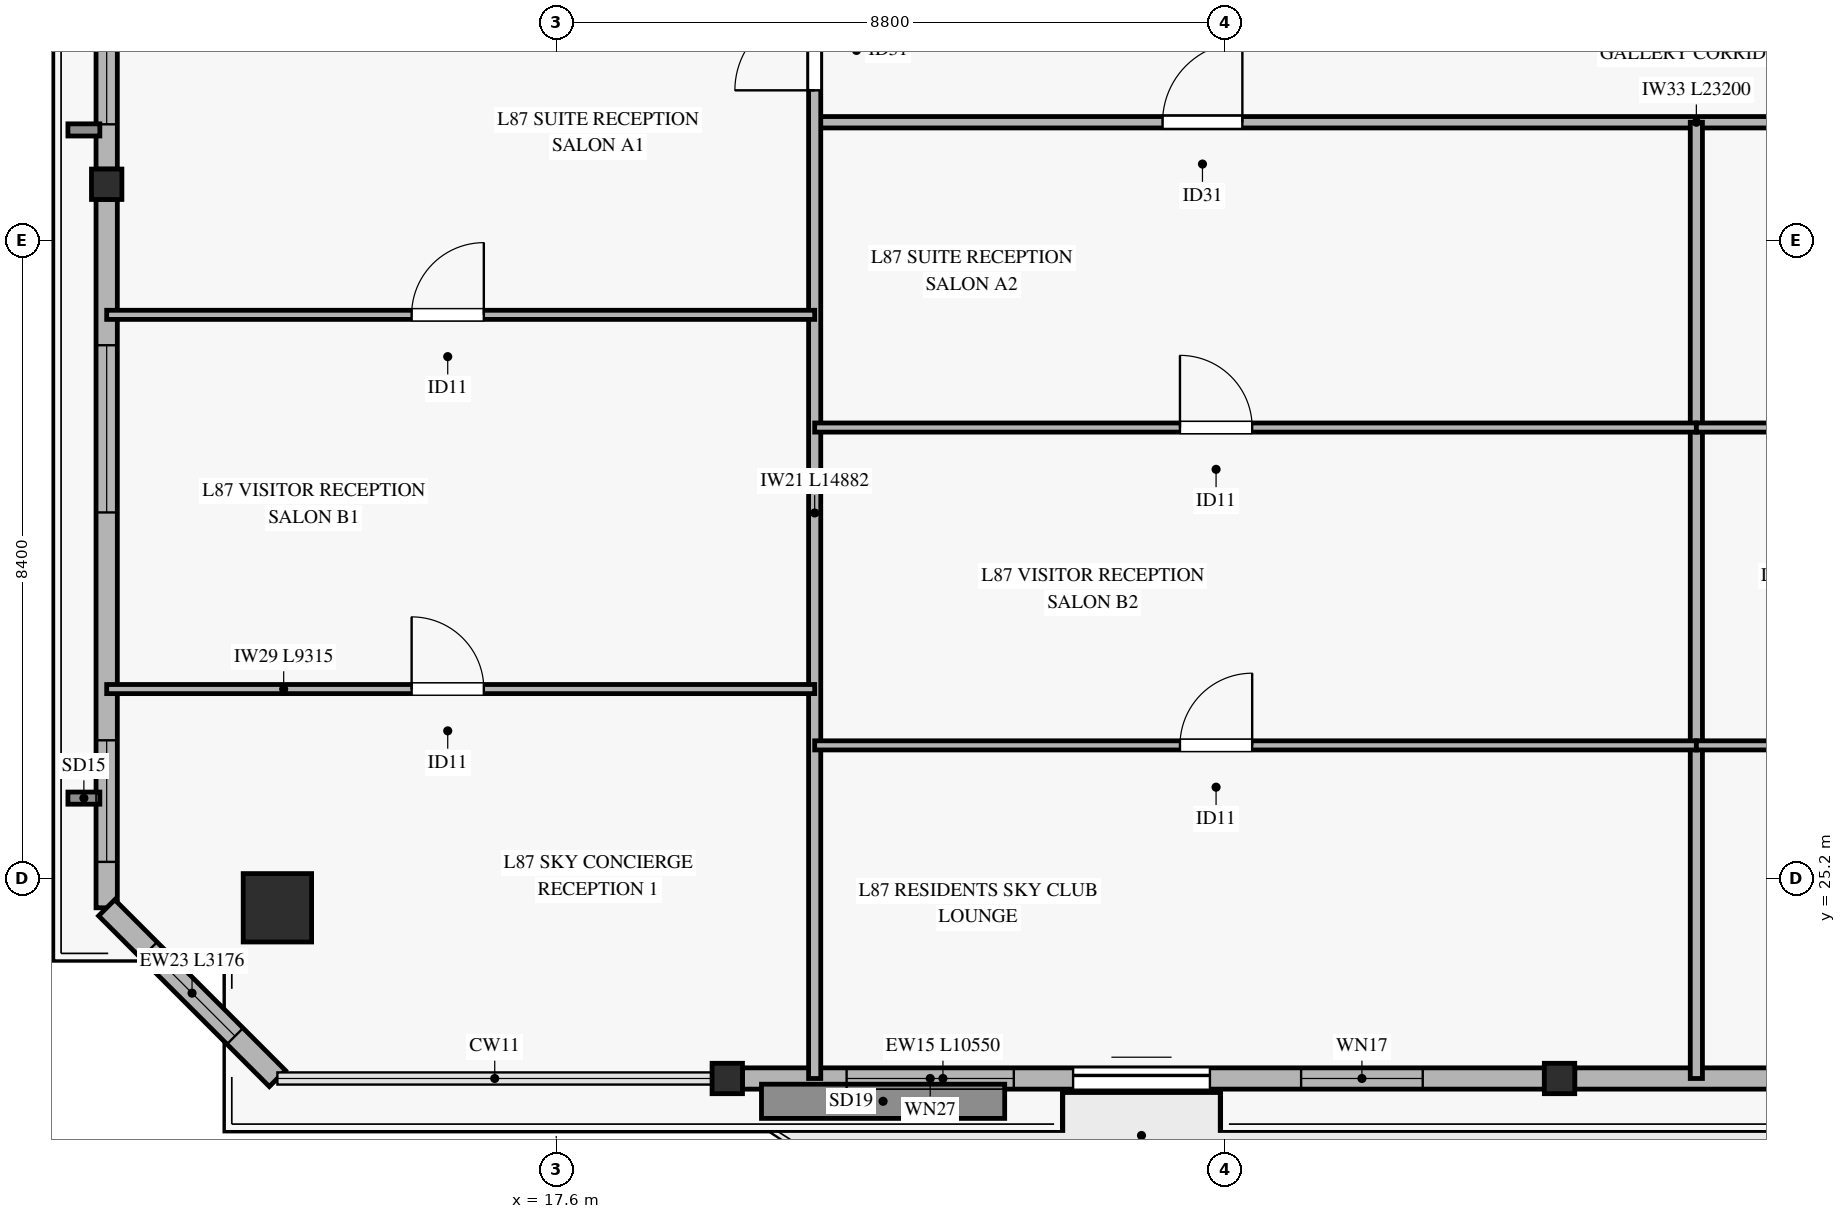
"""IFC4 building model, lengths in metres.
Left out: names, types, materials, properties, quantities, classifications, styles, units other than length and angle.
Written with IfcOpenShell. Run it as: python <this file> out.ifc"""

import sys

from ifc_helpers import new_model, si_unit, direction, frame, frame_2d, origin, origin_2d, place, context, subcontext, project, spatial, rectangle, hollow_rectangle, extrude, source, transform, mapped, element, fill, save


model = new_model("IFC4")
c1 = context("Model", 3, precision=1e-05, world=origin(), true_north=direction((0.0, 1.0)))
c2 = subcontext(c1, "Body", "Model", "MODEL_VIEW")
j1 = project(units=[si_unit("LENGTHUNIT", "METRE"), si_unit("PLANEANGLEUNIT", "RADIAN")], contexts=[c1])
p1 = place(None, origin())
s1 = spatial("IfcSite", under=j1, at=p1, CompositionType="ELEMENT")
p2 = place(p1, origin())
s2 = spatial("IfcBuilding", under=s1, at=p2, CompositionType="ELEMENT")
p3 = place(p2, frame((0.0, 0.0, 335.7)))
s3 = spatial("IfcBuildingStorey", under=s2, at=p3, CompositionType="ELEMENT", Elevation=335.7)
m1 = source(origin(), c2, "Body", "SweptSolid", [
    extrude(hollow_rectangle(XDim=0.9, YDim=0.9, WallThickness=0.04, at=origin_2d()), origin(), (0.0, 0.0, 1.0), 3.185),
])
p4 = place(p3, frame((13.931, 24.814, 0.0), z_axis=(0.0, 0.0, 1.0), x_axis=(1.0, 0.0, 0.0)))
e1 = element("IfcColumn", 1, at=p4, inside=s3, PredefinedType="COLUMN", context=c2, shape_type="MappedRepresentation", body=[
    mapped(m1, transform((0.0, 0.0, 0.0), x_axis=(1.0, 0.0, 0.0), y_axis=(0.0, 1.0, 0.0), z_axis=(0.0, 0.0, 1.0), scale=1.0)),
])
m2 = source(origin(), c2, "Body", "SweptSolid", [
    extrude(hollow_rectangle(XDim=0.4, YDim=0.4, WallThickness=0.02, at=origin_2d()), origin(), (0.0, 0.0, 1.0), 3.185),
])
for number, where, z_axis, x_axis in (
    (2, (19.85, 22.568, 0.0), (0.0, 0.0, 1.0), (1.0, 0.0, 0.0)),
    (3, (30.8, 22.568, 0.0), (0.0, 0.0, 1.0), (1.0, 0.0, 0.0)),
    (4, (11.685, 34.334, 0.0), (0.0, 0.0, 1.0), (1.0, 0.0, 0.0)),
):
    element("IfcColumn", number, at=place(p3, frame(where, z_axis=z_axis, x_axis=x_axis)), inside=s3, PredefinedType="COLUMN", context=c2, shape_type="MappedRepresentation", body=[
        mapped(m2, transform((0.0, 0.0, 0.0), x_axis=(1.0, 0.0, 0.0), y_axis=(0.0, 1.0, 0.0), z_axis=(0.0, 0.0, 1.0), scale=1.0)),
    ])
p5 = place(p3, frame((20.05, 22.568, 0.0), z_axis=(0.0, 0.0, 1.0), x_axis=(1.0, 0.0, 0.0)))
e5 = element("IfcWall", 5, at=p5, inside=s3, PredefinedType="SOLIDWALL", context=c2, shape_type="SweptSolid", body=[
    extrude(rectangle(XDim=10.55, YDim=0.28, at=frame_2d((5.275, 0.0))), origin(), (0.0, 0.0, 1.0), 2.815),
])
p6 = place(p5, frame((4.35, 0.0, 0.0)))
e6 = element("IfcOpeningElement", 6, at=p6, cuts=e5, PredefinedType="OPENING", context=c2, shape_type="SweptSolid", body=[
    extrude(rectangle(XDim=1.8, YDim=2.25, at=frame_2d((0.9, 1.125))), frame((0.0, 0.15, 0.0), z_axis=(0.0, -1.0, 0.0), x_axis=(1.0, 0.0, 0.0)), (0.0, 0.0, 1.0), 0.3),
])
p7 = place(p5, frame((1.37, 0.0, 0.45)))
e7 = element("IfcOpeningElement", 7, at=p7, cuts=e5, PredefinedType="OPENING", context=c2, shape_type="SweptSolid", body=[
    extrude(rectangle(XDim=2.2, YDim=2.1, at=frame_2d((1.1, 1.05))), frame((0.0, 0.15, 0.0), z_axis=(0.0, -1.0, 0.0), x_axis=(1.0, 0.0, 0.0)), (0.0, 0.0, 1.0), 0.3),
])
p8 = place(p5, frame((7.35, 0.0, 0.45)))
e8 = element("IfcOpeningElement", 8, at=p8, cuts=e5, PredefinedType="OPENING", context=c2, shape_type="SweptSolid", body=[
    extrude(rectangle(XDim=1.6, YDim=2.0, at=frame_2d((0.8, 1.0))), frame((0.0, 0.15, 0.0), z_axis=(0.0, -1.0, 0.0), x_axis=(1.0, 0.0, 0.0)), (0.0, 0.0, 1.0), 0.3),
])
p9 = place(p3, frame((31.0, 22.568, 0.0), z_axis=(0.0, 0.0, 1.0), x_axis=(1.0, 0.0, 0.0)))
e9 = element("IfcWall", 9, at=p9, inside=s3, PredefinedType="SOLIDWALL", context=c2, shape_type="SweptSolid", body=[
    extrude(rectangle(XDim=6.35, YDim=0.28, at=frame_2d((3.175, 0.0))), origin(), (0.0, 0.0, 1.0), 2.815),
])
p10 = place(p3, frame((11.685, 24.814, 0.0), z_axis=(0.0, 0.0, 1.0), x_axis=(0.0, 1.0, 0.0)))
e10 = element("IfcWall", 10, at=p10, inside=s3, PredefinedType="SOLIDWALL", context=c2, shape_type="SweptSolid", body=[
    extrude(rectangle(XDim=9.32, YDim=0.28, at=frame_2d((4.66, 0.0))), origin(), (0.0, 0.0, 1.0), 2.815),
])
p11 = place(p10, frame((0.604, 0.0, 0.45)))
e11 = element("IfcOpeningElement", 11, at=p11, cuts=e10, PredefinedType="OPENING", context=c2, shape_type="SweptSolid", body=[
    extrude(rectangle(XDim=1.6, YDim=2.0, at=frame_2d((0.8, 1.0))), frame((0.0, 0.15, 0.0), z_axis=(0.0, -1.0, 0.0), x_axis=(1.0, 0.0, 0.0)), (0.0, 0.0, 1.0), 0.3),
])
p12 = place(p10, frame((5.202, 0.0, 0.45)))
e12 = element("IfcOpeningElement", 12, at=p12, cuts=e10, PredefinedType="OPENING", context=c2, shape_type="SweptSolid", body=[
    extrude(rectangle(XDim=2.2, YDim=2.1, at=frame_2d((1.1, 1.05))), frame((0.0, 0.15, 0.0), z_axis=(0.0, -1.0, 0.0), x_axis=(1.0, 0.0, 0.0)), (0.0, 0.0, 1.0), 0.3),
])
p13 = place(p3, frame((11.685, 34.534, 0.0), z_axis=(0.0, 0.0, 1.0), x_axis=(0.0, 1.0, 0.0)))
e13 = element("IfcWall", 13, at=p13, inside=s3, PredefinedType="SOLIDWALL", context=c2, shape_type="SweptSolid", body=[
    extrude(rectangle(XDim=9.32, YDim=0.28, at=frame_2d((4.66, 0.0))), origin(), (0.0, 0.0, 1.0), 2.815),
])
p14 = place(p13, frame((0.589, 0.0, 0.45)))
e14 = element("IfcOpeningElement", 14, at=p14, cuts=e13, PredefinedType="OPENING", context=c2, shape_type="SweptSolid", body=[
    extrude(rectangle(XDim=1.6, YDim=2.0, at=frame_2d((0.8, 1.0))), frame((0.0, 0.15, 0.0), z_axis=(0.0, -1.0, 0.0), x_axis=(1.0, 0.0, 0.0)), (0.0, 0.0, 1.0), 0.3),
])
p15 = place(p3, frame((11.685, 24.814, 0.0), z_axis=(0.0, 0.0, 1.0), x_axis=(0.707106781187, -0.707106781187, 0.0)))
e15 = element("IfcWall", 15, at=p15, inside=s3, PredefinedType="SOLIDWALL", context=c2, shape_type="SweptSolid", body=[
    extrude(rectangle(XDim=3.176, YDim=0.3, at=frame_2d((1.588, 0.0))), origin(), (0.0, 0.0, 1.0), 2.815),
])
p16 = place(p15, frame((0.788, 0.0, 0.45)))
e16 = element("IfcOpeningElement", 16, at=p16, cuts=e15, PredefinedType="OPENING", context=c2, shape_type="SweptSolid", body=[
    extrude(rectangle(XDim=1.6, YDim=2.0, at=frame_2d((0.8, 1.0))), frame((0.0, 0.16, 0.0), z_axis=(0.0, -1.0, 0.0), x_axis=(1.0, 0.0, 0.0)), (0.0, 0.0, 1.0), 0.32),
])
p17 = place(p3, frame((21.0, 35.15, 0.0), z_axis=(0.0, 0.0, 1.0), x_axis=(1.0, 0.0, 0.0)))
e17 = element("IfcWall", 17, at=p17, inside=s3, PredefinedType="PARTITIONING", context=c2, shape_type="SweptSolid", body=[
    extrude(rectangle(XDim=23.2, YDim=0.15, at=frame_2d((11.6, 0.0))), origin(), (0.0, 0.0, 1.0), 2.47),
])
p18 = place(p17, frame((4.577, 0.0, 0.0)))
e18 = element("IfcOpeningElement", 18, at=p18, cuts=e17, PredefinedType="OPENING", context=c2, shape_type="SweptSolid", body=[
    extrude(rectangle(XDim=1.05, YDim=2.15, at=frame_2d((0.525, 1.075))), frame((0.0, 0.085, 0.0), z_axis=(0.0, -1.0, 0.0), x_axis=(1.0, 0.0, 0.0)), (0.0, 0.0, 1.0), 0.17),
])
p19 = place(p17, frame((16.177, 0.0, 0.0)))
e19 = element("IfcOpeningElement", 19, at=p19, cuts=e17, PredefinedType="OPENING", context=c2, shape_type="SweptSolid", body=[
    extrude(rectangle(XDim=1.05, YDim=2.15, at=frame_2d((0.525, 1.075))), frame((0.0, 0.085, 0.0), z_axis=(0.0, -1.0, 0.0), x_axis=(1.0, 0.0, 0.0)), (0.0, 0.0, 1.0), 0.17),
])
p20 = place(p3, frame((21.0, 22.568, 0.0), z_axis=(0.0, 0.0, 1.0), x_axis=(0.0, 1.0, 0.0)))
e20 = element("IfcWall", 20, at=p20, inside=s3, PredefinedType="PARTITIONING", context=c2, shape_type="SweptSolid", body=[
    extrude(rectangle(XDim=14.882, YDim=0.16, at=frame_2d((7.441, 0.0))), origin(), (0.0, 0.0, 1.0), 2.77),
])
p21 = place(p20, frame((13.002, 0.0, 0.0)))
e21 = element("IfcOpeningElement", 21, at=p21, cuts=e20, PredefinedType="OPENING", context=c2, shape_type="SweptSolid", body=[
    extrude(rectangle(XDim=1.05, YDim=2.15, at=frame_2d((0.525, 1.075))), frame((0.0, 0.09, 0.0), z_axis=(0.0, -1.0, 0.0), x_axis=(1.0, 0.0, 0.0)), (0.0, 0.0, 1.0), 0.18),
])
p22 = place(p3, frame((32.6, 22.568, 0.0), z_axis=(0.0, 0.0, 1.0), x_axis=(0.0, 1.0, 0.0)))
e22 = element("IfcWall", 22, at=p22, inside=s3, PredefinedType="PARTITIONING", context=c2, shape_type="SweptSolid", body=[
    extrude(rectangle(XDim=12.582, YDim=0.16, at=frame_2d((6.291, 0.0))), origin(), (0.0, 0.0, 1.0), 2.77),
])
p23 = place(p3, frame((11.685, 27.692, 0.0), z_axis=(0.0, 0.0, 1.0), x_axis=(1.0, 0.0, 0.0)))
e23 = element("IfcWall", 23, at=p23, inside=s3, PredefinedType="PARTITIONING", context=c2, shape_type="SweptSolid", body=[
    extrude(rectangle(XDim=9.315, YDim=0.12, at=frame_2d((4.657, 0.0))), origin(), (0.0, 0.0, 1.0), 2.47),
])
p24 = place(p23, frame((4.012, 0.0, 0.0)))
e24 = element("IfcOpeningElement", 24, at=p24, cuts=e23, PredefinedType="OPENING", context=c2, shape_type="SweptSolid", body=[
    extrude(rectangle(XDim=0.95, YDim=2.1, at=frame_2d((0.475, 1.05))), frame((0.0, 0.07, 0.0), z_axis=(0.0, -1.0, 0.0), x_axis=(1.0, 0.0, 0.0)), (0.0, 0.0, 1.0), 0.14),
])
p25 = place(p3, frame((11.685, 32.616, 0.0), z_axis=(0.0, 0.0, 1.0), x_axis=(1.0, 0.0, 0.0)))
e25 = element("IfcWall", 25, at=p25, inside=s3, PredefinedType="PARTITIONING", context=c2, shape_type="SweptSolid", body=[
    extrude(rectangle(XDim=9.315, YDim=0.12, at=frame_2d((4.657, 0.0))), origin(), (0.0, 0.0, 1.0), 2.47),
])
p26 = place(p25, frame((4.012, 0.0, 0.0)))
e26 = element("IfcOpeningElement", 26, at=p26, cuts=e25, PredefinedType="OPENING", context=c2, shape_type="SweptSolid", body=[
    extrude(rectangle(XDim=0.95, YDim=2.1, at=frame_2d((0.475, 1.05))), frame((0.0, 0.07, 0.0), z_axis=(0.0, -1.0, 0.0), x_axis=(1.0, 0.0, 0.0)), (0.0, 0.0, 1.0), 0.14),
])
p27 = place(p3, frame((21.0, 26.951, 0.0), z_axis=(0.0, 0.0, 1.0), x_axis=(1.0, 0.0, 0.0)))
e27 = element("IfcWall", 27, at=p27, inside=s3, PredefinedType="PARTITIONING", context=c2, shape_type="SweptSolid", body=[
    extrude(rectangle(XDim=11.6, YDim=0.12, at=frame_2d((5.8, 0.0))), origin(), (0.0, 0.0, 1.0), 2.47),
])
p28 = place(p27, frame((4.806, 0.0, 0.0)))
e28 = element("IfcOpeningElement", 28, at=p28, cuts=e27, PredefinedType="OPENING", context=c2, shape_type="SweptSolid", body=[
    extrude(rectangle(XDim=0.95, YDim=2.1, at=frame_2d((0.475, 1.05))), frame((0.0, 0.07, 0.0), z_axis=(0.0, -1.0, 0.0), x_axis=(1.0, 0.0, 0.0)), (0.0, 0.0, 1.0), 0.14),
])
p29 = place(p3, frame((21.0, 31.133, 0.0), z_axis=(0.0, 0.0, 1.0), x_axis=(1.0, 0.0, 0.0)))
e29 = element("IfcWall", 29, at=p29, inside=s3, PredefinedType="PARTITIONING", context=c2, shape_type="SweptSolid", body=[
    extrude(rectangle(XDim=11.6, YDim=0.12, at=frame_2d((5.8, 0.0))), origin(), (0.0, 0.0, 1.0), 2.47),
])
p30 = place(p29, frame((4.806, 0.0, 0.0)))
e30 = element("IfcOpeningElement", 30, at=p30, cuts=e29, PredefinedType="OPENING", context=c2, shape_type="SweptSolid", body=[
    extrude(rectangle(XDim=0.95, YDim=2.1, at=frame_2d((0.475, 1.05))), frame((0.0, 0.07, 0.0), z_axis=(0.0, -1.0, 0.0), x_axis=(1.0, 0.0, 0.0)), (0.0, 0.0, 1.0), 0.14),
])
p31 = place(p3, frame((32.6, 26.951, 0.0), z_axis=(0.0, 0.0, 1.0), x_axis=(1.0, 0.0, 0.0)))
e31 = element("IfcWall", 31, at=p31, inside=s3, PredefinedType="PARTITIONING", context=c2, shape_type="SweptSolid", body=[
    extrude(rectangle(XDim=11.6, YDim=0.12, at=frame_2d((5.8, 0.0))), origin(), (0.0, 0.0, 1.0), 2.47),
])
p32 = place(p31, frame((4.806, 0.0, 0.0)))
e32 = element("IfcOpeningElement", 32, at=p32, cuts=e31, PredefinedType="OPENING", context=c2, shape_type="SweptSolid", body=[
    extrude(rectangle(XDim=0.95, YDim=2.1, at=frame_2d((0.475, 1.05))), frame((0.0, 0.07, 0.0), z_axis=(0.0, -1.0, 0.0), x_axis=(1.0, 0.0, 0.0)), (0.0, 0.0, 1.0), 0.14),
])
p33 = place(p3, frame((32.6, 31.133, 0.0), z_axis=(0.0, 0.0, 1.0), x_axis=(1.0, 0.0, 0.0)))
e33 = element("IfcWall", 33, at=p33, inside=s3, PredefinedType="PARTITIONING", context=c2, shape_type="SweptSolid", body=[
    extrude(rectangle(XDim=11.6, YDim=0.12, at=frame_2d((5.8, 0.0))), origin(), (0.0, 0.0, 1.0), 2.47),
])
p34 = place(p33, frame((4.806, 0.0, 0.0)))
e34 = element("IfcOpeningElement", 34, at=p34, cuts=e33, PredefinedType="OPENING", context=c2, shape_type="SweptSolid", body=[
    extrude(rectangle(XDim=0.95, YDim=2.1, at=frame_2d((0.475, 1.05))), frame((0.0, 0.07, 0.0), z_axis=(0.0, -1.0, 0.0), x_axis=(1.0, 0.0, 0.0)), (0.0, 0.0, 1.0), 0.14),
])
m3 = source(origin(), c2, "Body", "SweptSolid", [
    extrude(rectangle(XDim=1.8, YDim=2.25, at=frame_2d((0.9, 1.125))), frame((0.0, 0.025, 0.0), z_axis=(0.0, -1.0, 0.0), x_axis=(1.0, 0.0, 0.0)), (0.0, 0.0, 1.0), 0.05),
])
p35 = place(p6, origin())
e35 = element("IfcDoor", 35, at=p35, inside=s3, OperationType="SLIDING_TO_LEFT", PredefinedType="DOOR", context=c2, shape_type="MappedRepresentation", body=[
    mapped(m3, transform((0.0, 0.0, 0.0), x_axis=(1.0, 0.0, 0.0), y_axis=(0.0, 1.0, 0.0), z_axis=(0.0, 0.0, 1.0), scale=1.0)),
])
fill(e6, e35)
m4 = source(origin(), c2, "Body", "SweptSolid", [
    extrude(rectangle(XDim=2.2, YDim=2.1, at=frame_2d((1.1, 1.05))), frame((0.0, 0.03, 0.0), z_axis=(0.0, -1.0, 0.0), x_axis=(1.0, 0.0, 0.0)), (0.0, 0.0, 1.0), 0.06),
])
p36 = place(p7, origin())
e36 = element("IfcWindow", 36, at=p36, inside=s3, PartitioningType="SINGLE_PANEL", PredefinedType="WINDOW", context=c2, shape_type="MappedRepresentation", body=[
    mapped(m4, transform((0.0, 0.0, 0.0), x_axis=(1.0, 0.0, 0.0), y_axis=(0.0, 1.0, 0.0), z_axis=(0.0, 0.0, 1.0), scale=1.0)),
])
fill(e7, e36)
m5 = source(origin(), c2, "Body", "SweptSolid", [
    extrude(rectangle(XDim=1.6, YDim=2.0, at=frame_2d((0.8, 1.0))), frame((0.0, 0.03, 0.0), z_axis=(0.0, -1.0, 0.0), x_axis=(1.0, 0.0, 0.0)), (0.0, 0.0, 1.0), 0.06),
])
p37 = place(p8, origin())
e37 = element("IfcWindow", 37, at=p37, inside=s3, PartitioningType="SINGLE_PANEL", PredefinedType="WINDOW", context=c2, shape_type="MappedRepresentation", body=[
    mapped(m5, transform((0.0, 0.0, 0.0), x_axis=(1.0, 0.0, 0.0), y_axis=(0.0, 1.0, 0.0), z_axis=(0.0, 0.0, 1.0), scale=1.0)),
])
fill(e8, e37)
p38 = place(p11, origin())
e38 = element("IfcWindow", 38, at=p38, inside=s3, PartitioningType="SINGLE_PANEL", PredefinedType="WINDOW", context=c2, shape_type="MappedRepresentation", body=[
    mapped(m5, transform((0.0, 0.0, 0.0), x_axis=(1.0, 0.0, 0.0), y_axis=(0.0, 1.0, 0.0), z_axis=(0.0, 0.0, 1.0), scale=1.0)),
])
fill(e11, e38)
p39 = place(p12, origin())
e39 = element("IfcWindow", 39, at=p39, inside=s3, PartitioningType="SINGLE_PANEL", PredefinedType="WINDOW", context=c2, shape_type="MappedRepresentation", body=[
    mapped(m4, transform((0.0, 0.0, 0.0), x_axis=(1.0, 0.0, 0.0), y_axis=(0.0, 1.0, 0.0), z_axis=(0.0, 0.0, 1.0), scale=1.0)),
])
fill(e12, e39)
p40 = place(p14, origin())
e40 = element("IfcWindow", 40, at=p40, inside=s3, PartitioningType="SINGLE_PANEL", PredefinedType="WINDOW", context=c2, shape_type="MappedRepresentation", body=[
    mapped(m5, transform((0.0, 0.0, 0.0), x_axis=(1.0, 0.0, 0.0), y_axis=(0.0, 1.0, 0.0), z_axis=(0.0, 0.0, 1.0), scale=1.0)),
])
fill(e14, e40)
p41 = place(p16, origin())
e41 = element("IfcWindow", 41, at=p41, inside=s3, PartitioningType="SINGLE_PANEL", PredefinedType="WINDOW", context=c2, shape_type="MappedRepresentation", body=[
    mapped(m5, transform((0.0, 0.0, 0.0), x_axis=(1.0, 0.0, 0.0), y_axis=(0.0, 1.0, 0.0), z_axis=(0.0, 0.0, 1.0), scale=1.0)),
])
fill(e16, e41)
m6 = source(origin(), c2, "Body", "SweptSolid", [
    extrude(rectangle(XDim=1.05, YDim=2.15, at=frame_2d((0.525, 1.075))), frame((0.0, 0.025, 0.0), z_axis=(0.0, -1.0, 0.0), x_axis=(1.0, 0.0, 0.0)), (0.0, 0.0, 1.0), 0.05),
])
p42 = place(p21, origin())
e42 = element("IfcDoor", 42, at=p42, inside=s3, OperationType="SINGLE_SWING_LEFT", PredefinedType="DOOR", context=c2, shape_type="MappedRepresentation", body=[
    mapped(m6, transform((0.0, 0.0, 0.0), x_axis=(1.0, 0.0, 0.0), y_axis=(0.0, 1.0, 0.0), z_axis=(0.0, 0.0, 1.0), scale=1.0)),
])
fill(e21, e42)
m7 = source(origin(), c2, "Body", "SweptSolid", [
    extrude(rectangle(XDim=0.95, YDim=2.1, at=frame_2d((0.475, 1.05))), frame((0.0, 0.025, 0.0), z_axis=(0.0, -1.0, 0.0), x_axis=(1.0, 0.0, 0.0)), (0.0, 0.0, 1.0), 0.05),
])
p43 = place(p26, origin())
e43 = element("IfcDoor", 43, at=p43, inside=s3, OperationType="SINGLE_SWING_RIGHT", PredefinedType="DOOR", context=c2, shape_type="MappedRepresentation", body=[
    mapped(m7, transform((0.0, 0.0, 0.0), x_axis=(1.0, 0.0, 0.0), y_axis=(0.0, 1.0, 0.0), z_axis=(0.0, 0.0, 1.0), scale=1.0)),
])
fill(e26, e43)
p44 = place(p24, origin())
e44 = element("IfcDoor", 44, at=p44, inside=s3, OperationType="SINGLE_SWING_LEFT", PredefinedType="DOOR", context=c2, shape_type="MappedRepresentation", body=[
    mapped(m7, transform((0.0, 0.0, 0.0), x_axis=(1.0, 0.0, 0.0), y_axis=(0.0, 1.0, 0.0), z_axis=(0.0, 0.0, 1.0), scale=1.0)),
])
fill(e24, e44)
p45 = place(p18, origin())
e45 = element("IfcDoor", 45, at=p45, inside=s3, OperationType="SINGLE_SWING_RIGHT", PredefinedType="DOOR", context=c2, shape_type="MappedRepresentation", body=[
    mapped(m6, transform((0.0, 0.0, 0.0), x_axis=(1.0, 0.0, 0.0), y_axis=(0.0, 1.0, 0.0), z_axis=(0.0, 0.0, 1.0), scale=1.0)),
])
fill(e18, e45)
p46 = place(p30, origin())
e46 = element("IfcDoor", 46, at=p46, inside=s3, OperationType="SINGLE_SWING_LEFT", PredefinedType="DOOR", context=c2, shape_type="MappedRepresentation", body=[
    mapped(m7, transform((0.0, 0.0, 0.0), x_axis=(1.0, 0.0, 0.0), y_axis=(0.0, 1.0, 0.0), z_axis=(0.0, 0.0, 1.0), scale=1.0)),
])
fill(e30, e46)
p47 = place(p28, origin())
e47 = element("IfcDoor", 47, at=p47, inside=s3, OperationType="SINGLE_SWING_RIGHT", PredefinedType="DOOR", context=c2, shape_type="MappedRepresentation", body=[
    mapped(m7, transform((0.0, 0.0, 0.0), x_axis=(1.0, 0.0, 0.0), y_axis=(0.0, 1.0, 0.0), z_axis=(0.0, 0.0, 1.0), scale=1.0)),
])
fill(e28, e47)
save(model, sys.argv[1])
